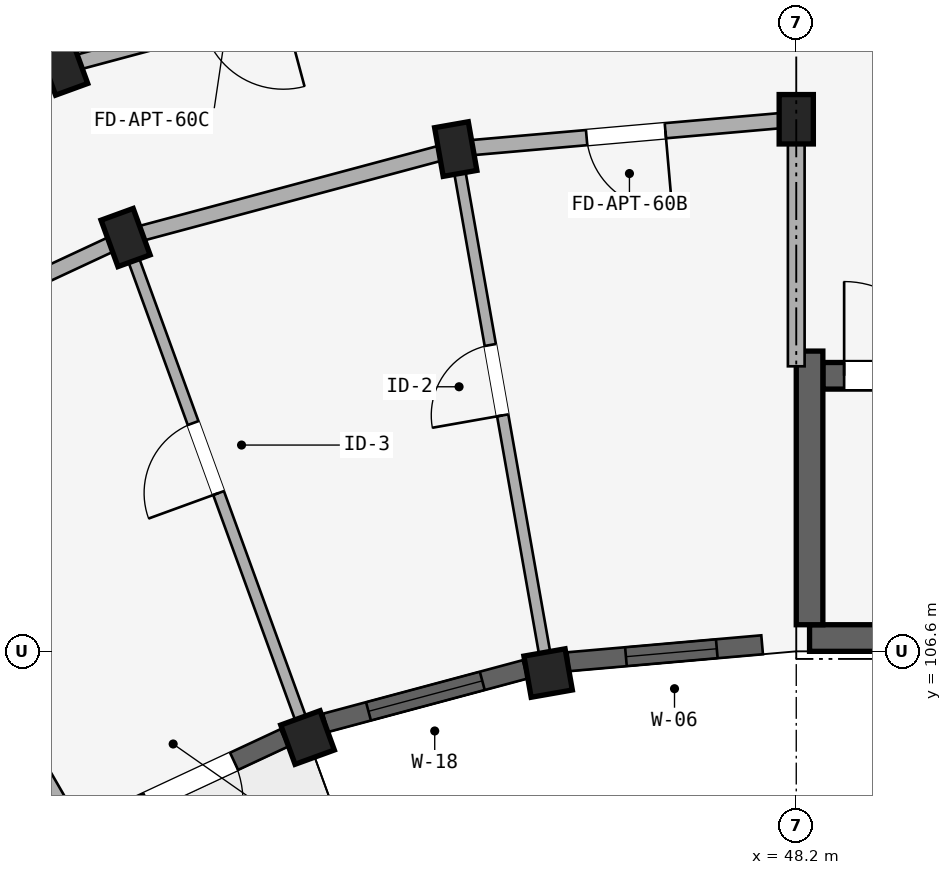
"""IFC4 building model, lengths in metres.
Left out: names, types, materials, properties, quantities, classifications, styles, units other than length and angle.
Written with IfcOpenShell. Run it as: python <this file> out.ifc"""

import sys

from ifc_helpers import new_model, si_unit, direction, frame, frame_2d, origin, origin_2d, place, context, subcontext, project, spatial, rectangle, extrude, element, fill, save


model = new_model("IFC4")
c1 = context("Model", 3, precision=1e-05, world=origin(), true_north=direction((0.0, 1.0)))
c2 = subcontext(c1, "Body", "Model", "MODEL_VIEW")
j1 = project(units=[si_unit("LENGTHUNIT", "METRE"), si_unit("PLANEANGLEUNIT", "RADIAN")], contexts=[c1])
p1 = place(None, origin())
s1 = spatial("IfcSite", under=j1, at=p1, CompositionType="ELEMENT")
p2 = place(p1, origin())
s2 = spatial("IfcBuilding", under=s1, at=p2, CompositionType="ELEMENT")
p3 = place(p2, frame((0.0, 0.0, 37.05)))
s3 = spatial("IfcBuildingStorey", under=s2, at=p3, CompositionType="ELEMENT", Elevation=37.05)
p4 = place(p3, frame((48.375, 106.775, 0.0), z_axis=(0.0, 0.0, 1.0), x_axis=(1.0, 0.0, 0.0)))
e1 = element("IfcWall", 1, at=p4, inside=s3, PredefinedType="SHEAR", context=c2, shape_type="SweptSolid", body=[
    extrude(rectangle(XDim=8.25, YDim=0.35, at=frame_2d((4.125, 0.0))), origin(), (0.0, 0.0, 1.0), 2.93),
])
p5 = place(p3, frame((48.55, 110.225, 0.0), z_axis=(0.0, 0.0, 1.0), x_axis=(1.0, 0.0, 0.0)))
e2 = element("IfcWall", 2, at=p5, inside=s3, PredefinedType="SHEAR", context=c2, shape_type="SweptSolid", body=[
    extrude(rectangle(XDim=7.9, YDim=0.35, at=frame_2d((3.95, 0.0))), origin(), (0.0, 0.0, 1.0), 2.93),
])
p6 = place(p5, frame((0.28, 0.0, 0.0)))
e3 = element("IfcOpeningElement", 3, at=p6, cuts=e2, PredefinedType="OPENING", context=c2, shape_type="SweptSolid", body=[
    extrude(rectangle(XDim=1.24, YDim=2.15, at=frame_2d((0.62, 1.075))), frame((0.0, 0.185, 0.0), z_axis=(0.0, -1.0, 0.0), x_axis=(1.0, 0.0, 0.0)), (0.0, 0.0, 1.0), 0.37),
])
p7 = place(p3, frame((48.375, 106.95, 0.0), z_axis=(0.0, 0.0, 1.0), x_axis=(0.0, 1.0, 0.0)))
e4 = element("IfcWall", 4, at=p7, inside=s3, PredefinedType="SHEAR", context=c2, shape_type="SweptSolid", body=[
    extrude(rectangle(XDim=3.6, YDim=0.35, at=frame_2d((1.8, 0.0))), origin(), (0.0, 0.0, 1.0), 2.93),
])
p8 = place(p3, frame((48.2, 113.6, 0.0), z_axis=(0.0, 0.0, 1.0), x_axis=(1.0, 0.0, 0.0)))
e5 = element("IfcColumn", 5, at=p8, inside=s3, PredefinedType="COLUMN", context=c2, shape_type="SweptSolid", body=[
    extrude(rectangle(XDim=0.45, YDim=0.65, at=origin_2d()), origin(), (0.0, 0.0, 1.0), 2.93),
])
p9 = place(p3, frame((44.935, 106.314, 0.0), z_axis=(0.0, 0.0, 1.0), x_axis=(0.984807753012, 0.173648177667, 0.0)))
e6 = element("IfcColumn", 6, at=p9, inside=s3, PredefinedType="COLUMN", context=c2, shape_type="SweptSolid", body=[
    extrude(rectangle(XDim=0.55, YDim=0.55, at=origin_2d()), origin(), (0.0, 0.0, 1.0), 2.93),
])
p10 = place(p3, frame((43.72, 113.208, 0.0), z_axis=(0.0, 0.0, 1.0), x_axis=(0.984807753012, 0.173648177667, 0.0)))
e7 = element("IfcColumn", 7, at=p10, inside=s3, PredefinedType="COLUMN", context=c2, shape_type="SweptSolid", body=[
    extrude(rectangle(XDim=0.45, YDim=0.65, at=origin_2d()), origin(), (0.0, 0.0, 1.0), 2.93),
])
p11 = place(p3, frame((41.77, 105.466, 0.0), z_axis=(0.0, 0.0, 1.0), x_axis=(0.939692620786, 0.342020143326, 0.0)))
e8 = element("IfcColumn", 8, at=p11, inside=s3, PredefinedType="COLUMN", context=c2, shape_type="SweptSolid", body=[
    extrude(rectangle(XDim=0.55, YDim=0.55, at=origin_2d()), origin(), (0.0, 0.0, 1.0), 2.93),
])
for number, where, z_axis, x_axis in (
    (9, (39.376, 112.044, 0.0), (0.0, 0.0, 1.0), (0.94, 0.342, 0.0)),
    (10, (38.555, 114.299, 0.0), (0.0, 0.0, 1.0), (0.94, 0.342, 0.0)),
):
    element("IfcColumn", number, at=place(p3, frame(where, z_axis=z_axis, x_axis=x_axis)), inside=s3, PredefinedType="COLUMN", context=c2, shape_type="SweptSolid", body=[
        extrude(rectangle(XDim=0.45, YDim=0.65, at=origin_2d()), origin(), (0.0, 0.0, 1.0), 2.93),
    ])
p12 = place(p3, frame((48.2, 113.6, 0.0), z_axis=(0.0, 0.0, 1.0), x_axis=(-0.996191949488, -0.087187153726, 0.0)))
e11 = element("IfcWall", 11, at=p12, inside=s3, PredefinedType="STANDARD", context=c2, shape_type="SweptSolid", body=[
    extrude(rectangle(XDim=4.497, YDim=0.2, at=frame_2d((2.249, 0.0))), origin(), (0.0, 0.0, 1.0), 2.372),
])
p13 = place(p12, frame((1.729, 0.0, 0.0)))
e12 = element("IfcOpeningElement", 12, at=p13, cuts=e11, PredefinedType="OPENING", context=c2, shape_type="SweptSolid", body=[
    extrude(rectangle(XDim=1.04, YDim=2.15, at=frame_2d((0.52, 1.075))), frame((0.0, 0.11, 0.0), z_axis=(0.0, -1.0, 0.0), x_axis=(1.0, 0.0, 0.0)), (0.0, 0.0, 1.0), 0.22),
])
p14 = place(p3, frame((43.72, 113.208, 0.0), z_axis=(0.0, 0.0, 1.0), x_axis=(-0.965934240054, -0.258787642463, 0.0)))
e13 = element("IfcWall", 13, at=p14, inside=s3, PredefinedType="STANDARD", context=c2, shape_type="SweptSolid", body=[
    extrude(rectangle(XDim=4.497, YDim=0.2, at=frame_2d((2.249, 0.0))), origin(), (0.0, 0.0, 1.0), 2.372),
])
p15 = place(p3, frame((43.303, 115.572, 0.0), z_axis=(0.0, 0.0, 1.0), x_axis=(-0.965930095386, -0.258803112091, 0.0)))
e14 = element("IfcWall", 14, at=p15, inside=s3, PredefinedType="STANDARD", context=c2, shape_type="SweptSolid", body=[
    extrude(rectangle(XDim=4.916, YDim=0.2, at=frame_2d((2.458, 0.0))), origin(), (0.0, 0.0, 1.0), 2.372),
])
p16 = place(p15, frame((1.918, 0.0, 0.0)))
e15 = element("IfcOpeningElement", 15, at=p16, cuts=e14, PredefinedType="OPENING", context=c2, shape_type="SweptSolid", body=[
    extrude(rectangle(XDim=1.08, YDim=2.15, at=frame_2d((0.54, 1.075))), frame((0.0, 0.11, 0.0), z_axis=(0.0, -1.0, 0.0), x_axis=(1.0, 0.0, 0.0)), (0.0, 0.0, 1.0), 0.22),
])
p17 = place(p3, frame((39.376, 112.044, 0.0), z_axis=(0.0, 0.0, 1.0), x_axis=(-0.906307919131, -0.422617978463, 0.0)))
e16 = element("IfcWall", 16, at=p17, inside=s3, PredefinedType="STANDARD", context=c2, shape_type="SweptSolid", body=[
    extrude(rectangle(XDim=4.497, YDim=0.2, at=frame_2d((2.249, 0.0))), origin(), (0.0, 0.0, 1.0), 2.372),
])
p18 = place(p3, frame((38.555, 114.299, 0.0), z_axis=(0.0, 0.0, 1.0), x_axis=(-0.906302381024, -0.422629854778, 0.0)))
e17 = element("IfcWall", 17, at=p18, inside=s3, PredefinedType="STANDARD", context=c2, shape_type="SweptSolid", body=[
    extrude(rectangle(XDim=4.915, YDim=0.2, at=frame_2d((2.458, 0.0))), origin(), (0.0, 0.0, 1.0), 2.372),
])
p19 = place(p3, frame((48.2, 110.35, 0.0), z_axis=(0.0, 0.0, 1.0), x_axis=(0.0, 1.0, 0.0)))
e18 = element("IfcWall", 18, at=p19, inside=s3, PredefinedType="STANDARD", context=c2, shape_type="SweptSolid", body=[
    extrude(rectangle(XDim=3.2, YDim=0.22, at=frame_2d((1.6, 0.0))), origin(), (0.0, 0.0, 1.0), 2.372),
])
p20 = place(p3, frame((44.901, 106.511, 0.0), z_axis=(0.0, 0.0, 1.0), x_axis=(-0.173647089161, 0.984807944945, 0.0)))
e19 = element("IfcWall", 19, at=p20, inside=s3, PredefinedType="PARTITIONING", context=c2, shape_type="SweptSolid", body=[
    extrude(rectangle(XDim=6.75, YDim=0.15, at=frame_2d((3.375, 0.0))), origin(), (0.0, 0.0, 1.0), 2.372),
])
p21 = place(p20, frame((3.242, 0.0, 0.0)))
e20 = element("IfcOpeningElement", 20, at=p21, cuts=e19, PredefinedType="OPENING", context=c2, shape_type="SweptSolid", body=[
    extrude(rectangle(XDim=0.94, YDim=2.1, at=frame_2d((0.47, 1.05))), frame((0.0, 0.085, 0.0), z_axis=(0.0, -1.0, 0.0), x_axis=(1.0, 0.0, 0.0)), (0.0, 0.0, 1.0), 0.17),
])
p22 = place(p3, frame((41.702, 105.654, 0.0), z_axis=(0.0, 0.0, 1.0), x_axis=(-0.342010221662, 0.939696231917, 0.0)))
e21 = element("IfcWall", 21, at=p22, inside=s3, PredefinedType="PARTITIONING", context=c2, shape_type="SweptSolid", body=[
    extrude(rectangle(XDim=6.75, YDim=0.15, at=frame_2d((3.375, 0.0))), origin(), (0.0, 0.0, 1.0), 2.372),
])
p23 = place(p22, frame((3.222, 0.0, 0.0)))
e22 = element("IfcOpeningElement", 22, at=p23, cuts=e21, PredefinedType="OPENING", context=c2, shape_type="SweptSolid", body=[
    extrude(rectangle(XDim=0.98, YDim=2.12, at=frame_2d((0.49, 1.06))), frame((0.0, 0.085, 0.0), z_axis=(0.0, -1.0, 0.0), x_axis=(1.0, 0.0, 0.0)), (0.0, 0.0, 1.0), 0.17),
])
p24 = place(p3, frame((38.521, 114.393, 0.0), z_axis=(0.0, 0.0, 1.0), x_axis=(-0.342022120477, 0.939691901159, 0.0)))
e23 = element("IfcWall", 23, at=p24, inside=s3, PredefinedType="PARTITIONING", context=c2, shape_type="SweptSolid", body=[
    extrude(rectangle(XDim=17.42, YDim=0.125, at=frame_2d((8.71, 0.0))), origin(), (0.0, 0.0, 1.0), 2.372),
])
p25 = place(p24, frame((4.45, 0.0, 0.0)))
e24 = element("IfcOpeningElement", 24, at=p25, cuts=e23, PredefinedType="OPENING", context=c2, shape_type="SweptSolid", body=[
    extrude(rectangle(XDim=0.8, YDim=2.1, at=frame_2d((0.4, 1.05))), frame((0.0, 0.073, 0.0), z_axis=(0.0, -1.0, 0.0), x_axis=(1.0, 0.0, 0.0)), (0.0, 0.0, 1.0), 0.145),
])
p26 = place(p3, frame((38.7, 104.254, 0.0), z_axis=(0.0, 0.0, 1.0), x_axis=(-0.499997969693, 0.866026575979, 0.0)))
e25 = element("IfcWall", 25, at=p26, inside=s3, PredefinedType="STANDARD", context=c2, shape_type="SweptSolid", body=[
    extrude(rectangle(XDim=6.75, YDim=0.22, at=frame_2d((3.375, 0.0))), origin(), (0.0, 0.0, 1.0), 2.372),
])
p27 = place(p3, frame((47.751, 106.686, 0.0), z_axis=(0.0, 0.0, 1.0), x_axis=(-0.996188847542, -0.087222589008, 0.0)))
e26 = element("IfcWall", 26, at=p27, inside=s3, PredefinedType="STANDARD", context=c2, shape_type="SweptSolid", body=[
    extrude(rectangle(XDim=2.558, YDim=0.25, at=frame_2d((1.279, 0.0))), origin(), (0.0, 0.0, 1.0), 2.422),
])
p28 = place(p27, frame((0.599, 0.0, 0.722)))
e27 = element("IfcOpeningElement", 27, at=p28, cuts=e26, PredefinedType="OPENING", context=c2, shape_type="SweptSolid", body=[
    extrude(rectangle(XDim=1.2, YDim=1.5, at=frame_2d((0.6, 0.75))), frame((0.0, 0.135, 0.0), z_axis=(0.0, -1.0, 0.0), x_axis=(1.0, 0.0, 0.0)), (0.0, 0.0, 1.0), 0.27),
])
p29 = place(p3, frame((44.634, 106.363, 0.0), z_axis=(0.0, 0.0, 1.0), x_axis=(-0.965928818058, -0.258807879411, 0.0)))
e28 = element("IfcWall", 28, at=p29, inside=s3, PredefinedType="STANDARD", context=c2, shape_type="SweptSolid", body=[
    extrude(rectangle(XDim=2.72, YDim=0.25, at=frame_2d((1.36, 0.0))), origin(), (0.0, 0.0, 1.0), 2.422),
])
p30 = place(p29, frame((0.585, 0.0, 0.622)))
e29 = element("IfcOpeningElement", 29, at=p30, cuts=e28, PredefinedType="OPENING", context=c2, shape_type="SweptSolid", body=[
    extrude(rectangle(XDim=1.55, YDim=1.6, at=frame_2d((0.775, 0.8))), frame((0.0, 0.135, 0.0), z_axis=(0.0, -1.0, 0.0), x_axis=(1.0, 0.0, 0.0)), (0.0, 0.0, 1.0), 0.27),
])
p31 = place(p3, frame((41.465, 105.462, 0.0), z_axis=(0.0, 0.0, 1.0), x_axis=(-0.906302358412, -0.422629903269, 0.0)))
e30 = element("IfcWall", 30, at=p31, inside=s3, PredefinedType="STANDARD", context=c2, shape_type="SweptSolid", body=[
    extrude(rectangle(XDim=2.72, YDim=0.25, at=frame_2d((1.36, 0.0))), origin(), (0.0, 0.0, 1.0), 2.422),
])
p32 = place(p31, frame((0.73, 0.0, 0.0)))
e31 = element("IfcOpeningElement", 31, at=p32, cuts=e30, PredefinedType="OPENING", context=c2, shape_type="SweptSolid", body=[
    extrude(rectangle(XDim=1.26, YDim=2.15, at=frame_2d((0.63, 1.075))), frame((0.0, 0.135, 0.0), z_axis=(0.0, -1.0, 0.0), x_axis=(1.0, 0.0, 0.0)), (0.0, 0.0, 1.0), 0.27),
])
p33 = place(p28, origin())
e32 = element("IfcWindow", 32, at=p33, inside=s3, PartitioningType="SINGLE_PANEL", PredefinedType="WINDOW", context=c2, shape_type="SweptSolid", body=[
    extrude(rectangle(XDim=1.2, YDim=1.5, at=frame_2d((0.6, 0.75))), frame((0.0, 0.03, 0.0), z_axis=(0.0, -1.0, 0.0), x_axis=(1.0, 0.0, 0.0)), (0.0, 0.0, 1.0), 0.06),
])
fill(e27, e32)
p34 = place(p30, origin())
e33 = element("IfcWindow", 33, at=p34, inside=s3, PartitioningType="DOUBLE_PANEL_VERTICAL", PredefinedType="WINDOW", context=c2, shape_type="SweptSolid", body=[
    extrude(rectangle(XDim=1.55, YDim=1.6, at=frame_2d((0.775, 0.8))), frame((0.0, 0.03, 0.0), z_axis=(0.0, -1.0, 0.0), x_axis=(1.0, 0.0, 0.0)), (0.0, 0.0, 1.0), 0.06),
])
fill(e29, e33)
p35 = place(p6, frame((1.24, 0.0, 0.0), z_axis=(0.0, 0.0, 1.0), x_axis=(-1.0, 0.0, 0.0)))
e34 = element("IfcDoor", 34, at=p35, inside=s3, OperationType="SINGLE_SWING_RIGHT", PredefinedType="DOOR", context=c2, shape_type="SweptSolid", body=[
    extrude(rectangle(XDim=1.24, YDim=2.15, at=frame_2d((0.62, 1.075))), frame((0.0, 0.025, 0.0), z_axis=(0.0, -1.0, 0.0), x_axis=(1.0, 0.0, 0.0)), (0.0, 0.0, 1.0), 0.05),
])
fill(e3, e34)
p36 = place(p21, frame((0.94, 0.0, 0.0), z_axis=(0.0, 0.0, 1.0), x_axis=(-1.0, 0.0, 0.0)))
e35 = element("IfcDoor", 35, at=p36, inside=s3, OperationType="SINGLE_SWING_RIGHT", PredefinedType="DOOR", context=c2, shape_type="SweptSolid", body=[
    extrude(rectangle(XDim=0.94, YDim=2.1, at=frame_2d((0.47, 1.05))), frame((0.0, 0.025, 0.0), z_axis=(0.0, -1.0, 0.0), x_axis=(1.0, 0.0, 0.0)), (0.0, 0.0, 1.0), 0.05),
])
fill(e20, e35)
p37 = place(p23, origin())
e36 = element("IfcDoor", 36, at=p37, inside=s3, OperationType="SINGLE_SWING_LEFT", PredefinedType="DOOR", context=c2, shape_type="SweptSolid", body=[
    extrude(rectangle(XDim=0.98, YDim=2.12, at=frame_2d((0.49, 1.06))), frame((0.0, 0.025, 0.0), z_axis=(0.0, -1.0, 0.0), x_axis=(1.0, 0.0, 0.0)), (0.0, 0.0, 1.0), 0.05),
])
fill(e22, e36)
p38 = place(p13, frame((1.04, 0.0, 0.0), z_axis=(0.0, 0.0, 1.0), x_axis=(-1.0, 0.0, 0.0)))
e37 = element("IfcDoor", 37, at=p38, inside=s3, OperationType="SINGLE_SWING_RIGHT", PredefinedType="DOOR", context=c2, shape_type="SweptSolid", body=[
    extrude(rectangle(XDim=1.04, YDim=2.15, at=frame_2d((0.52, 1.075))), frame((0.0, 0.025, 0.0), z_axis=(0.0, -1.0, 0.0), x_axis=(1.0, 0.0, 0.0)), (0.0, 0.0, 1.0), 0.05),
])
fill(e12, e37)
p39 = place(p32, origin())
e38 = element("IfcDoor", 38, at=p39, inside=s3, OperationType="SINGLE_SWING_RIGHT", PredefinedType="DOOR", context=c2, shape_type="SweptSolid", body=[
    extrude(rectangle(XDim=1.26, YDim=2.15, at=frame_2d((0.63, 1.075))), frame((0.0, 0.025, 0.0), z_axis=(0.0, -1.0, 0.0), x_axis=(1.0, 0.0, 0.0)), (0.0, 0.0, 1.0), 0.05),
])
fill(e31, e38)
save(model, sys.argv[1])
